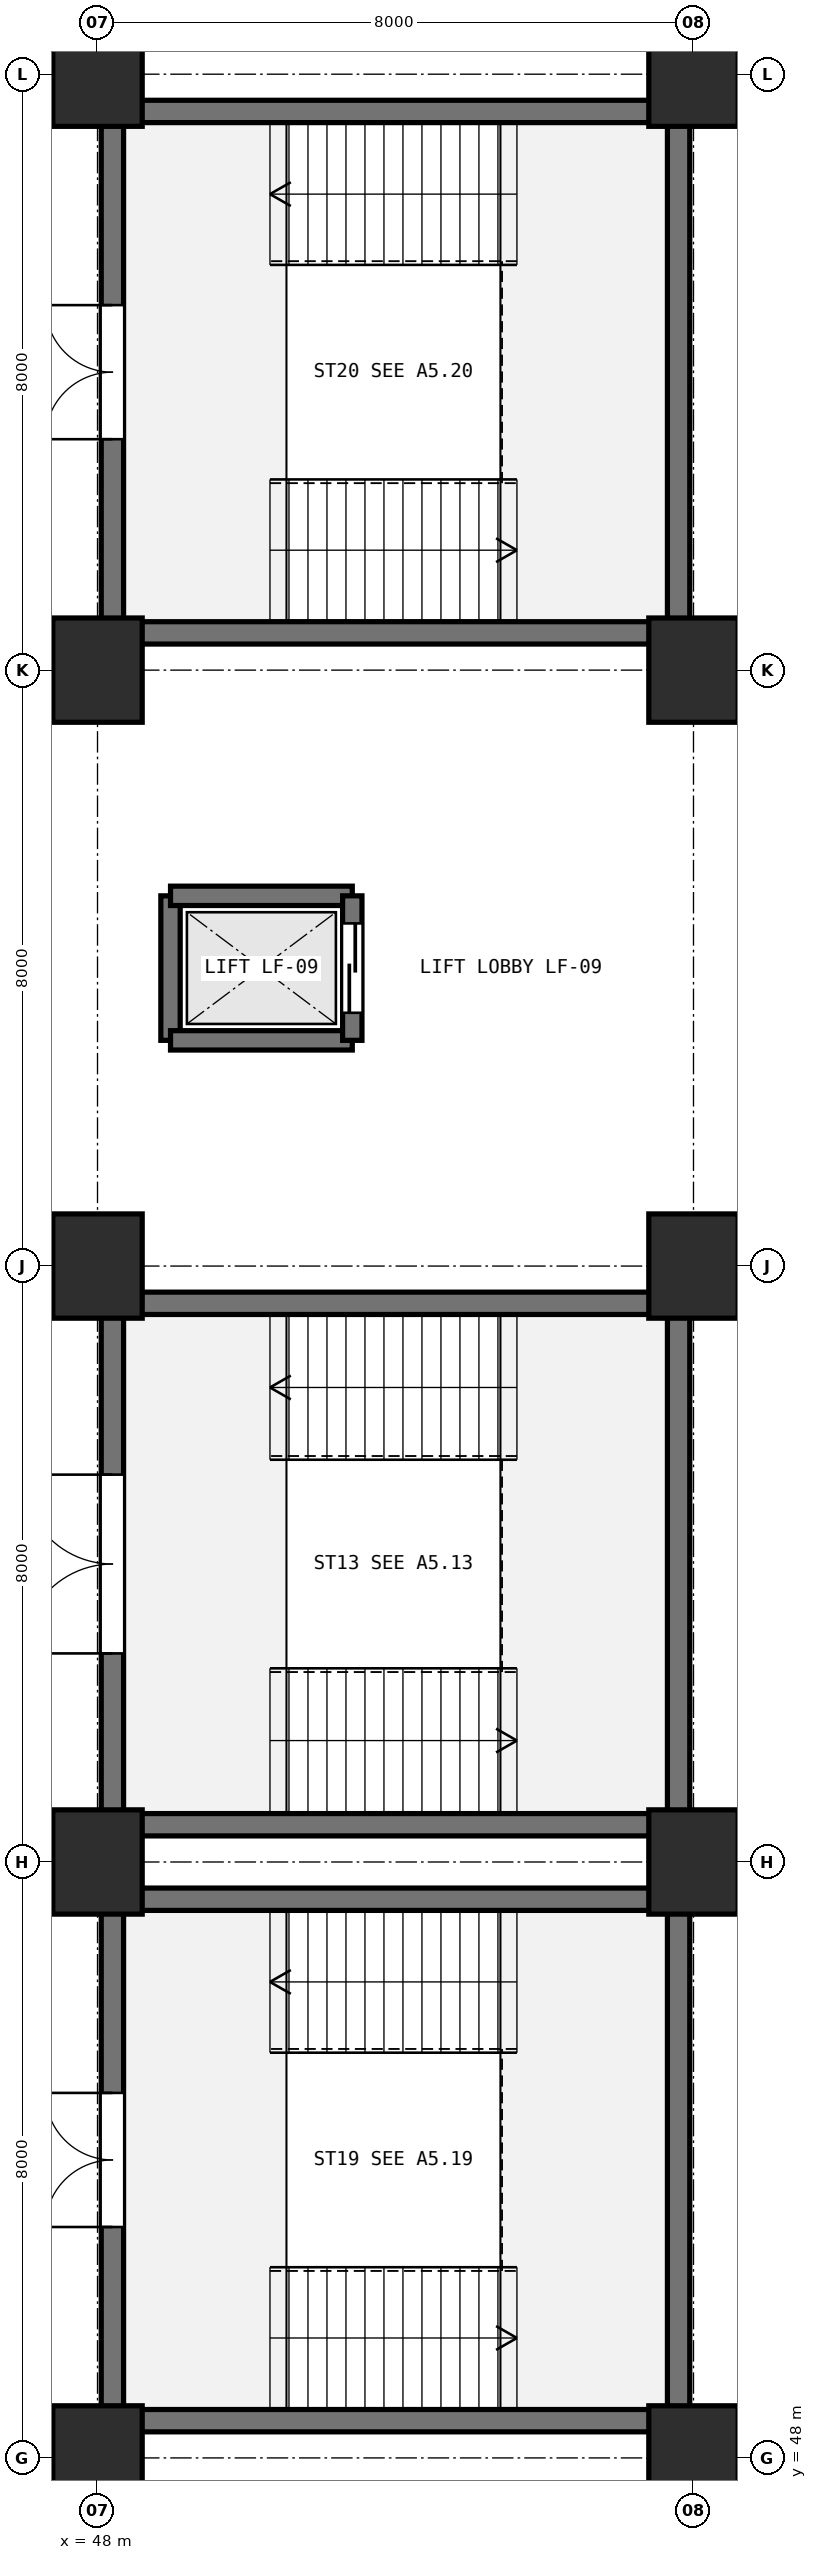
"""IFC4 building model, lengths in metres.
Left out: names, types, materials, properties, quantities, classifications, styles, units other than length and angle.
Written with IfcOpenShell. Run it as: python <this file> out.ifc"""

import sys

from ifc_helpers import new_model, si_unit, direction, frame, frame_2d, origin, origin_2d, place, context, subcontext, project, spatial, rectangle, extrude, element, fill, save


model = new_model("IFC4")
c1 = context("Model", 3, precision=1e-05, world=origin(), true_north=direction((0.0, 1.0)))
c2 = subcontext(c1, "Body", "Model", "MODEL_VIEW")
j1 = project(units=[si_unit("LENGTHUNIT", "METRE"), si_unit("PLANEANGLEUNIT", "RADIAN")], contexts=[c1])
p1 = place(None, origin())
s1 = spatial("IfcSite", under=j1, at=p1, CompositionType="ELEMENT")
p2 = place(p1, origin())
s2 = spatial("IfcBuilding", under=s1, at=p2, CompositionType="ELEMENT")
p3 = place(p2, frame((0.0, 0.0, -4.8)))
s3 = spatial("IfcBuildingStorey", under=s2, at=p3, CompositionType="ELEMENT", Elevation=-4.8)
for number, where, z_axis, x_axis in (
    (1, (48.0, 48.0, 0.0), (0.0, 0.0, 1.0), (1.0, 0.0, 0.0)),
    (2, (48.0, 56.0, 0.0), (0.0, 0.0, 1.0), (1.0, 0.0, 0.0)),
    (3, (48.0, 64.0, 0.0), (0.0, 0.0, 1.0), (1.0, 0.0, 0.0)),
    (4, (48.0, 72.0, 0.0), (0.0, 0.0, 1.0), (1.0, 0.0, 0.0)),
    (5, (48.0, 80.0, 0.0), (0.0, 0.0, 1.0), (1.0, 0.0, 0.0)),
    (6, (56.0, 48.0, 0.0), (0.0, 0.0, 1.0), (1.0, 0.0, 0.0)),
    (7, (56.0, 56.0, 0.0), (0.0, 0.0, 1.0), (1.0, 0.0, 0.0)),
    (8, (56.0, 64.0, 0.0), (0.0, 0.0, 1.0), (1.0, 0.0, 0.0)),
    (9, (56.0, 72.0, 0.0), (0.0, 0.0, 1.0), (1.0, 0.0, 0.0)),
    (10, (56.0, 80.0, 0.0), (0.0, 0.0, 1.0), (1.0, 0.0, 0.0)),
):
    element("IfcColumn", number, at=place(p3, frame(where, z_axis=z_axis, x_axis=x_axis)), inside=s3, PredefinedType="COLUMN", context=c2, shape_type="SweptSolid", body=[
        extrude(rectangle(XDim=1.2, YDim=1.4, at=origin_2d()), origin(), (0.0, 0.0, 1.0), 4.8),
    ])
p4 = place(p3, frame((55.8, 56.5, 0.0), z_axis=(0.0, 0.0, 1.0), x_axis=(-1.0, 0.0, 0.0)))
e11 = element("IfcWall", 11, at=p4, inside=s3, PredefinedType="SHEAR", context=c2, shape_type="SweptSolid", body=[
    extrude(rectangle(XDim=7.6, YDim=0.3, at=frame_2d((3.8, 0.0))), origin(), (0.0, 0.0, 1.0), 4.46),
])
p5 = place(p3, frame((48.2, 56.5, 0.0), z_axis=(0.0, 0.0, 1.0), x_axis=(0.0, 1.0, 0.0)))
e12 = element("IfcWall", 12, at=p5, inside=s3, PredefinedType="SHEAR", context=c2, shape_type="SweptSolid", body=[
    extrude(rectangle(XDim=7.0, YDim=0.3, at=frame_2d((3.5, 0.0))), origin(), (0.0, 0.0, 1.0), 4.46),
])
p6 = place(p5, frame((2.3, 0.0, 0.0)))
e13 = element("IfcOpeningElement", 13, at=p6, cuts=e12, PredefinedType="OPENING", context=c2, shape_type="SweptSolid", body=[
    extrude(rectangle(XDim=2.4, YDim=2.2, at=frame_2d((1.2, 1.1))), frame((0.0, 0.16, 0.0), z_axis=(0.0, -1.0, 0.0), x_axis=(1.0, 0.0, 0.0)), (0.0, 0.0, 1.0), 0.32),
])
p7 = place(p3, frame((48.2, 63.5, 0.0), z_axis=(0.0, 0.0, 1.0), x_axis=(1.0, 0.0, 0.0)))
e14 = element("IfcWall", 14, at=p7, inside=s3, PredefinedType="SHEAR", context=c2, shape_type="SweptSolid", body=[
    extrude(rectangle(XDim=7.6, YDim=0.3, at=frame_2d((3.8, 0.0))), origin(), (0.0, 0.0, 1.0), 4.46),
])
p8 = place(p3, frame((55.8, 63.5, 0.0), z_axis=(0.0, 0.0, 1.0), x_axis=(0.0, -1.0, 0.0)))
e15 = element("IfcWall", 15, at=p8, inside=s3, PredefinedType="SHEAR", context=c2, shape_type="SweptSolid", body=[
    extrude(rectangle(XDim=7.0, YDim=0.3, at=frame_2d((3.5, 0.0))), origin(), (0.0, 0.0, 1.0), 4.46),
])
p9 = place(p3, frame((55.8, 48.5, 0.0), z_axis=(0.0, 0.0, 1.0), x_axis=(-1.0, 0.0, 0.0)))
e16 = element("IfcWall", 16, at=p9, inside=s3, PredefinedType="SHEAR", context=c2, shape_type="SweptSolid", body=[
    extrude(rectangle(XDim=7.6, YDim=0.3, at=frame_2d((3.8, 0.0))), origin(), (0.0, 0.0, 1.0), 4.46),
])
p10 = place(p3, frame((48.2, 48.5, 0.0), z_axis=(0.0, 0.0, 1.0), x_axis=(0.0, 1.0, 0.0)))
e17 = element("IfcWall", 17, at=p10, inside=s3, PredefinedType="SHEAR", context=c2, shape_type="SweptSolid", body=[
    extrude(rectangle(XDim=7.0, YDim=0.3, at=frame_2d((3.5, 0.0))), origin(), (0.0, 0.0, 1.0), 4.46),
])
p11 = place(p10, frame((2.6, 0.0, 0.0)))
e18 = element("IfcOpeningElement", 18, at=p11, cuts=e17, PredefinedType="OPENING", context=c2, shape_type="SweptSolid", body=[
    extrude(rectangle(XDim=1.8, YDim=2.2, at=frame_2d((0.9, 1.1))), frame((0.0, 0.16, 0.0), z_axis=(0.0, -1.0, 0.0), x_axis=(1.0, 0.0, 0.0)), (0.0, 0.0, 1.0), 0.32),
])
p12 = place(p3, frame((48.2, 55.5, 0.0), z_axis=(0.0, 0.0, 1.0), x_axis=(1.0, 0.0, 0.0)))
e19 = element("IfcWall", 19, at=p12, inside=s3, PredefinedType="SHEAR", context=c2, shape_type="SweptSolid", body=[
    extrude(rectangle(XDim=7.6, YDim=0.3, at=frame_2d((3.8, 0.0))), origin(), (0.0, 0.0, 1.0), 4.46),
])
p13 = place(p3, frame((55.8, 55.5, 0.0), z_axis=(0.0, 0.0, 1.0), x_axis=(0.0, -1.0, 0.0)))
e20 = element("IfcWall", 20, at=p13, inside=s3, PredefinedType="SHEAR", context=c2, shape_type="SweptSolid", body=[
    extrude(rectangle(XDim=7.0, YDim=0.3, at=frame_2d((3.5, 0.0))), origin(), (0.0, 0.0, 1.0), 4.46),
])
p14 = place(p3, frame((55.8, 72.5, 0.0), z_axis=(0.0, 0.0, 1.0), x_axis=(-1.0, 0.0, 0.0)))
e21 = element("IfcWall", 21, at=p14, inside=s3, PredefinedType="SHEAR", context=c2, shape_type="SweptSolid", body=[
    extrude(rectangle(XDim=7.6, YDim=0.3, at=frame_2d((3.8, 0.0))), origin(), (0.0, 0.0, 1.0), 4.46),
])
p15 = place(p3, frame((48.2, 72.5, 0.0), z_axis=(0.0, 0.0, 1.0), x_axis=(0.0, 1.0, 0.0)))
e22 = element("IfcWall", 22, at=p15, inside=s3, PredefinedType="SHEAR", context=c2, shape_type="SweptSolid", body=[
    extrude(rectangle(XDim=7.0, YDim=0.3, at=frame_2d((3.5, 0.0))), origin(), (0.0, 0.0, 1.0), 4.46),
])
p16 = place(p15, frame((2.6, 0.0, 0.0)))
e23 = element("IfcOpeningElement", 23, at=p16, cuts=e22, PredefinedType="OPENING", context=c2, shape_type="SweptSolid", body=[
    extrude(rectangle(XDim=1.8, YDim=2.2, at=frame_2d((0.9, 1.1))), frame((0.0, 0.16, 0.0), z_axis=(0.0, -1.0, 0.0), x_axis=(1.0, 0.0, 0.0)), (0.0, 0.0, 1.0), 0.32),
])
p17 = place(p3, frame((48.2, 79.5, 0.0), z_axis=(0.0, 0.0, 1.0), x_axis=(1.0, 0.0, 0.0)))
e24 = element("IfcWall", 24, at=p17, inside=s3, PredefinedType="SHEAR", context=c2, shape_type="SweptSolid", body=[
    extrude(rectangle(XDim=7.6, YDim=0.3, at=frame_2d((3.8, 0.0))), origin(), (0.0, 0.0, 1.0), 4.46),
])
p18 = place(p3, frame((55.8, 79.5, 0.0), z_axis=(0.0, 0.0, 1.0), x_axis=(0.0, -1.0, 0.0)))
e25 = element("IfcWall", 25, at=p18, inside=s3, PredefinedType="SHEAR", context=c2, shape_type="SweptSolid", body=[
    extrude(rectangle(XDim=7.0, YDim=0.3, at=frame_2d((3.5, 0.0))), origin(), (0.0, 0.0, 1.0), 4.46),
])
p19 = place(p3, frame((48.98, 67.03, 0.0), z_axis=(0.0, 0.0, 1.0), x_axis=(0.0, 1.0, 0.0)))
e26 = element("IfcWall", 26, at=p19, inside=s3, PredefinedType="SHEAR", context=c2, shape_type="SweptSolid", body=[
    extrude(rectangle(XDim=1.94, YDim=0.26, at=frame_2d((0.97, 0.0))), origin(), (0.0, 0.0, 1.0), 4.46),
])
for number, where, z_axis, x_axis in (
    (27, (48.98, 68.97, 0.0), (0.0, 0.0, 1.0), (1.0, 0.0, 0.0)),
    (28, (51.42, 67.03, 0.0), (0.0, 0.0, 1.0), (-1.0, 0.0, 0.0)),
):
    element("IfcWall", number, at=place(p3, frame(where, z_axis=z_axis, x_axis=x_axis)), inside=s3, PredefinedType="SHEAR", context=c2, shape_type="SweptSolid", body=[
        extrude(rectangle(XDim=2.44, YDim=0.26, at=frame_2d((1.22, 0.0))), origin(), (0.0, 0.0, 1.0), 4.46),
    ])
p20 = place(p3, frame((51.42, 68.97, 0.0), z_axis=(0.0, 0.0, 1.0), x_axis=(0.0, -1.0, 0.0)))
e29 = element("IfcWall", 29, at=p20, inside=s3, PredefinedType="SHEAR", context=c2, shape_type="SweptSolid", body=[
    extrude(rectangle(XDim=1.94, YDim=0.26, at=frame_2d((0.97, 0.0))), origin(), (0.0, 0.0, 1.0), 4.46),
])
p21 = place(p20, frame((0.37, 0.0, 0.0)))
e30 = element("IfcOpeningElement", 30, at=p21, cuts=e29, PredefinedType="OPENING", context=c2, shape_type="SweptSolid", body=[
    extrude(rectangle(XDim=1.2, YDim=2.15, at=frame_2d((0.6, 1.075))), frame((0.0, 0.14, 0.0), z_axis=(0.0, -1.0, 0.0), x_axis=(1.0, 0.0, 0.0)), (0.0, 0.0, 1.0), 0.28),
])
p22 = place(p6, frame((2.4, 0.0, 0.0), z_axis=(0.0, 0.0, 1.0), x_axis=(-1.0, 0.0, 0.0)))
e31 = element("IfcDoor", 31, at=p22, inside=s3, OperationType="DOUBLE_DOOR_SINGLE_SWING", PredefinedType="DOOR", context=c2, shape_type="SweptSolid", body=[
    extrude(rectangle(XDim=2.4, YDim=2.2, at=frame_2d((1.2, 1.1))), frame((0.0, 0.025, 0.0), z_axis=(0.0, -1.0, 0.0), x_axis=(1.0, 0.0, 0.0)), (0.0, 0.0, 1.0), 0.05),
])
fill(e13, e31)
p23 = place(p11, frame((1.8, 0.0, 0.0), z_axis=(0.0, 0.0, 1.0), x_axis=(-1.0, 0.0, 0.0)))
e32 = element("IfcDoor", 32, at=p23, inside=s3, OperationType="DOUBLE_DOOR_SINGLE_SWING", PredefinedType="DOOR", context=c2, shape_type="SweptSolid", body=[
    extrude(rectangle(XDim=1.8, YDim=2.2, at=frame_2d((0.9, 1.1))), frame((0.0, 0.025, 0.0), z_axis=(0.0, -1.0, 0.0), x_axis=(1.0, 0.0, 0.0)), (0.0, 0.0, 1.0), 0.05),
])
fill(e18, e32)
p24 = place(p16, frame((1.8, 0.0, 0.0), z_axis=(0.0, 0.0, 1.0), x_axis=(-1.0, 0.0, 0.0)))
e33 = element("IfcDoor", 33, at=p24, inside=s3, OperationType="DOUBLE_DOOR_SINGLE_SWING", PredefinedType="DOOR", context=c2, shape_type="SweptSolid", body=[
    extrude(rectangle(XDim=1.8, YDim=2.2, at=frame_2d((0.9, 1.1))), frame((0.0, 0.025, 0.0), z_axis=(0.0, -1.0, 0.0), x_axis=(1.0, 0.0, 0.0)), (0.0, 0.0, 1.0), 0.05),
])
fill(e23, e33)
p25 = place(p21, origin())
e34 = element("IfcDoor", 34, at=p25, inside=s3, OperationType="SLIDING_TO_LEFT", PredefinedType="DOOR", context=c2, shape_type="SweptSolid", body=[
    extrude(rectangle(XDim=1.2, YDim=2.15, at=frame_2d((0.6, 1.075))), frame((0.0, 0.025, 0.0), z_axis=(0.0, -1.0, 0.0), x_axis=(1.0, 0.0, 0.0)), (0.0, 0.0, 1.0), 0.05),
])
fill(e30, e34)
save(model, sys.argv[1])
